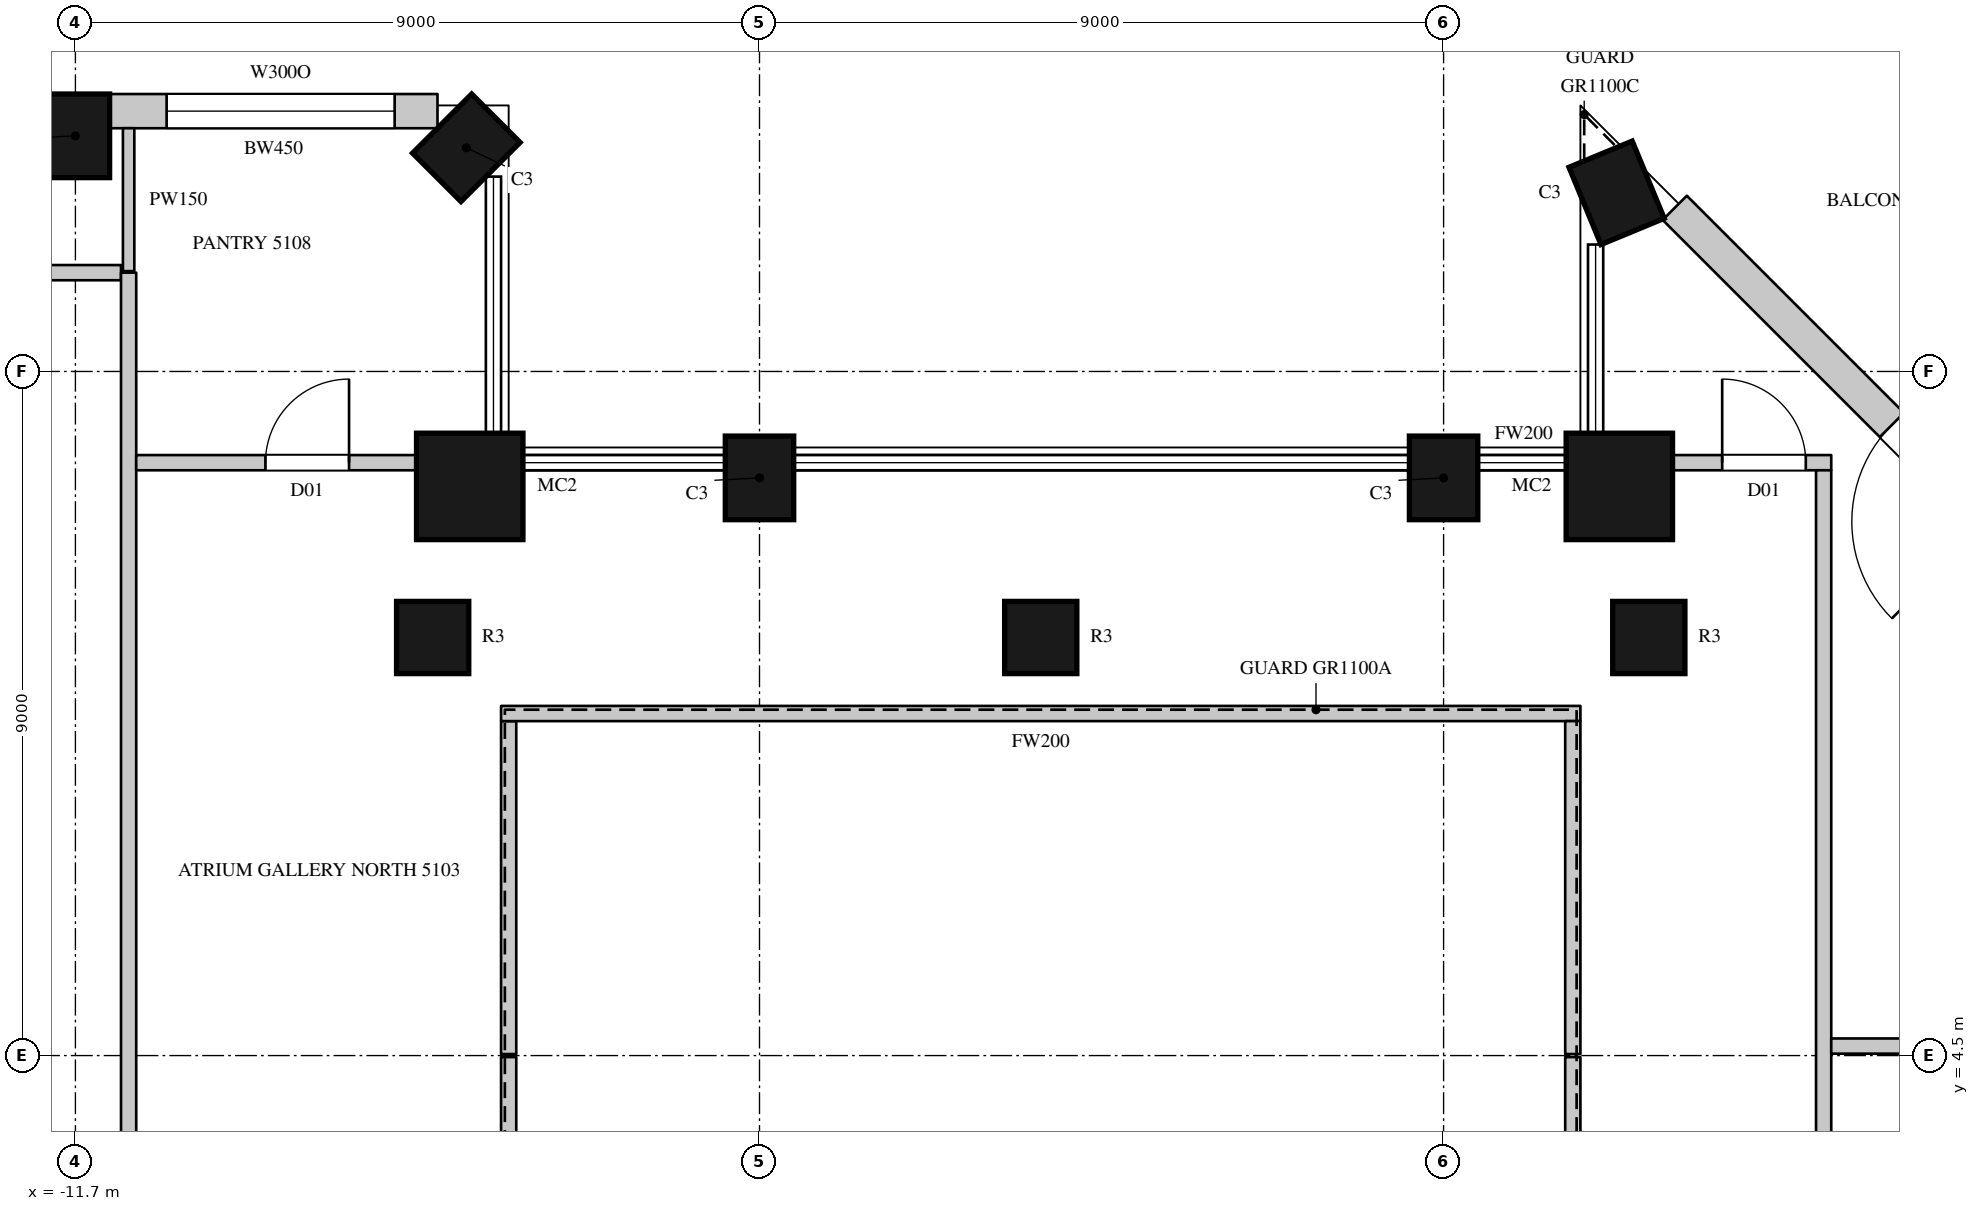
"""IFC4 building model, lengths in metres.
Left out: names, types, materials, properties, quantities, classifications, styles, units other than length and angle.
Written with IfcOpenShell. Run it as: python <this file> out.ifc"""

import sys

from ifc_helpers import new_model, si_unit, direction, frame, frame_2d, origin, origin_2d, place, context, subcontext, project, spatial, rectangle, circle, extrude, element, fill, save


model = new_model("IFC4")
c1 = context("Model", 3, precision=1e-05, world=origin(), true_north=direction((0.0, 1.0)))
c2 = subcontext(c1, "Body", "Model", "MODEL_VIEW")
j1 = project(units=[si_unit("LENGTHUNIT", "METRE"), si_unit("PLANEANGLEUNIT", "RADIAN")], contexts=[c1])
p1 = place(None, origin())
s1 = spatial("IfcSite", under=j1, at=p1, CompositionType="ELEMENT")
p2 = place(p1, origin())
s2 = spatial("IfcBuilding", under=s1, at=p2, CompositionType="ELEMENT")
p3 = place(p2, frame((0.0, 0.0, 230.2)))
s3 = spatial("IfcBuildingStorey", under=s2, at=p3, CompositionType="ELEMENT", Elevation=230.2)
p4 = place(p3, frame((8.576, 15.85, 0.0), z_axis=(0.0, 0.0, 1.0), x_axis=(-0.923879672772, -0.382683093746, 0.0)))
e1 = element("IfcColumn", 1, at=p4, inside=s3, PredefinedType="COLUMN", context=c2, shape_type="SweptSolid", body=[
    extrude(rectangle(XDim=0.9, YDim=1.1, at=origin_2d()), origin(), (0.0, 0.0, 1.0), 4.1),
])
p5 = place(p3, frame((8.612, 11.988, 0.0), z_axis=(0.0, 0.0, 1.0), x_axis=(1.0, 0.0, 0.0)))
e2 = element("IfcColumn", 2, at=p5, inside=s3, PredefinedType="COLUMN", context=c2, shape_type="SweptSolid", body=[
    extrude(circle(Radius=0.7, at=origin_2d()), origin(), (0.0, 0.0, 1.0), 4.1),
])
for number, where, z_axis, x_axis in (
    (3, (6.3, 12.1, 0.0), (0.0, 0.0, 1.0), (-1.0, 0.0, 0.0)),
    (4, (-2.7, 12.1, 0.0), (0.0, 0.0, 1.0), (-1.0, 0.0, 0.0)),
):
    element("IfcColumn", number, at=place(p3, frame(where, z_axis=z_axis, x_axis=x_axis)), inside=s3, PredefinedType="COLUMN", context=c2, shape_type="SweptSolid", body=[
        extrude(rectangle(XDim=0.9, YDim=1.1, at=origin_2d()), origin(), (0.0, 0.0, 1.0), 4.1),
    ])
p6 = place(p3, frame((-6.512, 11.988, 0.0), z_axis=(0.0, 0.0, 1.0), x_axis=(1.0, 0.0, 0.0)))
e5 = element("IfcColumn", 5, at=p6, inside=s3, PredefinedType="COLUMN", context=c2, shape_type="SweptSolid", body=[
    extrude(circle(Radius=0.7, at=origin_2d()), origin(), (0.0, 0.0, 1.0), 4.1),
])
for number, where, z_axis, x_axis in (
    (6, (-6.557, 16.443, 0.0), (0.0, 0.0, 1.0), (-0.707, 0.707, 0.0)),
    (7, (-11.7, 16.6, 0.0), (0.0, 0.0, 1.0), (-1.0, 0.0, 0.0)),
):
    element("IfcColumn", number, at=place(p3, frame(where, z_axis=z_axis, x_axis=x_axis)), inside=s3, PredefinedType="COLUMN", context=c2, shape_type="SweptSolid", body=[
        extrude(rectangle(XDim=0.9, YDim=1.1, at=origin_2d()), origin(), (0.0, 0.0, 1.0), 4.1),
    ])
for number, where, z_axis, x_axis in (
    (8, (-7.0, 10.0, 0.0), (0.0, 0.0, 1.0), (1.0, 0.0, 0.0)),
    (9, (1.0, 10.0, 0.0), (0.0, 0.0, 1.0), (1.0, 0.0, 0.0)),
    (10, (9.0, 10.0, 0.0), (0.0, 0.0, 1.0), (1.0, 0.0, 0.0)),
):
    element("IfcColumn", number, at=place(p3, frame(where, z_axis=z_axis, x_axis=x_axis)), inside=s3, PredefinedType="COLUMN", context=c2, shape_type="SweptSolid", body=[
        extrude(circle(Radius=0.475, at=origin_2d()), origin(), (0.0, 0.0, 1.0), 4.1),
    ])
p7 = place(p3, frame((13.941, 11.053, 0.0), z_axis=(0.0, 0.0, 1.0), x_axis=(-0.707106781187, 0.707106781187, 0.0)))
e11 = element("IfcWall", 11, at=p7, inside=s3, PredefinedType="SOLIDWALL", context=c2, shape_type="SweptSolid", body=[
    extrude(rectangle(XDim=6.505, YDim=0.45, at=frame_2d((3.252, 0.0))), origin(), (0.0, 0.0, 1.0), 3.8),
])
p8 = place(p7, frame((0.665, 0.0, 0.0)))
e12 = element("IfcOpeningElement", 12, at=p8, cuts=e11, PredefinedType="OPENING", context=c2, shape_type="SweptSolid", body=[
    extrude(rectangle(XDim=1.8, YDim=2.4, at=frame_2d((0.9, 1.2))), frame((0.0, 0.235, 0.0), z_axis=(0.0, -1.0, 0.0), x_axis=(1.0, 0.0, 0.0)), (0.0, 0.0, 1.0), 0.47),
])
p9 = place(p3, frame((-6.936, 16.925, 0.0), z_axis=(0.0, 0.0, 1.0), x_axis=(-1.0, 0.0, 0.0)))
e13 = element("IfcWall", 13, at=p9, inside=s3, PredefinedType="SOLIDWALL", context=c2, shape_type="SweptSolid", body=[
    extrude(rectangle(XDim=4.314, YDim=0.45, at=frame_2d((2.157, 0.0))), origin(), (0.0, 0.0, 1.0), 3.8),
])
p10 = place(p9, frame((0.564, 0.0, 1.05)))
e14 = element("IfcOpeningElement", 14, at=p10, cuts=e13, PredefinedType="OPENING", context=c2, shape_type="SweptSolid", body=[
    extrude(rectangle(XDim=3.0, YDim=2.4, at=frame_2d((1.5, 1.2))), frame((0.0, 0.235, 0.0), z_axis=(0.0, -1.0, 0.0), x_axis=(1.0, 0.0, 0.0)), (0.0, 0.0, 1.0), 0.47),
])
p11 = place(p3, frame((12.251, 14.263, 0.0), z_axis=(0.0, 0.0, 1.0), x_axis=(-0.707039709166, 0.707173846846, 0.0)))
e15 = element("IfcWall", 15, at=p11, inside=s3, PredefinedType="SOLIDWALL", context=c2, shape_type="SweptSolid", body=[
    extrude(rectangle(XDim=1.82, YDim=0.45, at=frame_2d((0.91, 0.0))), origin(), (0.0, 0.0, 1.0), 0.6),
])
p12 = place(p3, frame((-13.97, 14.8, 0.0), z_axis=(0.0, 0.0, 1.0), x_axis=(1.0, 0.0, 0.0)))
e16 = element("IfcWall", 16, at=p12, inside=s3, PredefinedType="PARTITIONING", context=c2, shape_type="SweptSolid", body=[
    extrude(rectangle(XDim=2.87, YDim=0.2, at=frame_2d((1.435, 0.0))), origin(), (0.0, 0.0, 1.0), 3.8),
])
p13 = place(p3, frame((-11.0, -14.8, 0.0), z_axis=(0.0, 0.0, 1.0), x_axis=(0.0, 1.0, 0.0)))
e17 = element("IfcWall", 17, at=p13, inside=s3, PredefinedType="PARTITIONING", context=c2, shape_type="SweptSolid", body=[
    extrude(rectangle(XDim=29.6, YDim=0.2, at=frame_2d((14.8, 0.0))), origin(), (0.0, 0.0, 1.0), 3.8),
])
p14 = place(p13, frame((10.15, 0.0, 0.0)))
e18 = element("IfcOpeningElement", 18, at=p14, cuts=e17, PredefinedType="OPENING", context=c2, shape_type="SweptSolid", body=[
    extrude(rectangle(XDim=1.5, YDim=2.4, at=frame_2d((0.75, 1.2))), frame((0.0, 0.11, 0.0), z_axis=(0.0, -1.0, 0.0), x_axis=(1.0, 0.0, 0.0)), (0.0, 0.0, 1.0), 0.22),
])
p15 = place(p3, frame((-10.9, 12.3, 0.0), z_axis=(0.0, 0.0, 1.0), x_axis=(1.0, 0.0, 0.0)))
e19 = element("IfcWall", 19, at=p15, inside=s3, PredefinedType="PARTITIONING", context=c2, shape_type="SweptSolid", body=[
    extrude(rectangle(XDim=3.735, YDim=0.2, at=frame_2d((1.867, 0.0))), origin(), (0.0, 0.0, 1.0), 3.8),
])
p16 = place(p15, frame((1.7, 0.0, 0.0)))
e20 = element("IfcOpeningElement", 20, at=p16, cuts=e19, PredefinedType="OPENING", context=c2, shape_type="SweptSolid", body=[
    extrude(rectangle(XDim=1.1, YDim=2.4, at=frame_2d((0.55, 1.2))), frame((0.0, 0.11, 0.0), z_axis=(0.0, -1.0, 0.0), x_axis=(1.0, 0.0, 0.0)), (0.0, 0.0, 1.0), 0.22),
])
p17 = place(p3, frame((-5.859, 12.3, 0.0), z_axis=(0.0, 0.0, 1.0), x_axis=(1.0, 0.0, 0.0)))
e21 = element("IfcWall", 21, at=p17, inside=s3, PredefinedType="PARTITIONING", context=c2, shape_type="SweptSolid", body=[
    extrude(rectangle(XDim=2.709, YDim=0.2, at=frame_2d((1.354, 0.0))), origin(), (0.0, 0.0, 1.0), 3.8),
])
p18 = place(p3, frame((-2.25, 12.3, 0.0), z_axis=(0.0, 0.0, 1.0), x_axis=(1.0, 0.0, 0.0)))
e22 = element("IfcWall", 22, at=p18, inside=s3, PredefinedType="PARTITIONING", context=c2, shape_type="SweptSolid", body=[
    extrude(rectangle(XDim=8.1, YDim=0.2, at=frame_2d((4.05, 0.0))), origin(), (0.0, 0.0, 1.0), 3.8),
])
p19 = place(p3, frame((6.75, 12.3, 0.0), z_axis=(0.0, 0.0, 1.0), x_axis=(1.0, 0.0, 0.0)))
e23 = element("IfcWall", 23, at=p19, inside=s3, PredefinedType="PARTITIONING", context=c2, shape_type="SweptSolid", body=[
    extrude(rectangle(XDim=1.209, YDim=0.2, at=frame_2d((0.604, 0.0))), origin(), (0.0, 0.0, 1.0), 3.8),
])
p20 = place(p3, frame((-6.0, -8.9, 0.0), z_axis=(0.0, 0.0, 1.0), x_axis=(0.0, 1.0, 0.0)))
e24 = element("IfcWall", 24, at=p20, inside=s3, PredefinedType="PARTITIONING", context=c2, shape_type="SweptSolid", body=[
    extrude(rectangle(XDim=13.38, YDim=0.2, at=frame_2d((6.69, 0.0))), origin(), (0.0, 0.0, 1.0), 3.8),
])
p21 = place(p3, frame((-6.0, 4.52, 0.0), z_axis=(0.0, 0.0, 1.0), x_axis=(0.0, 1.0, 0.0)))
e25 = element("IfcWall", 25, at=p21, inside=s3, PredefinedType="PARTITIONING", context=c2, shape_type="SweptSolid", body=[
    extrude(rectangle(XDim=4.38, YDim=0.2, at=frame_2d((2.19, 0.0))), origin(), (0.0, 0.0, 1.0), 3.8),
])
p22 = place(p3, frame((-6.1, 9.0, 0.0), z_axis=(0.0, 0.0, 1.0), x_axis=(1.0, 0.0, 0.0)))
e26 = element("IfcWall", 26, at=p22, inside=s3, PredefinedType="PARTITIONING", context=c2, shape_type="SweptSolid", body=[
    extrude(rectangle(XDim=14.2, YDim=0.2, at=frame_2d((7.1, 0.0))), origin(), (0.0, 0.0, 1.0), 3.8),
])
p23 = place(p3, frame((8.0, -8.9, 0.0), z_axis=(0.0, 0.0, 1.0), x_axis=(0.0, 1.0, 0.0)))
e27 = element("IfcWall", 27, at=p23, inside=s3, PredefinedType="PARTITIONING", context=c2, shape_type="SweptSolid", body=[
    extrude(rectangle(XDim=13.38, YDim=0.2, at=frame_2d((6.69, 0.0))), origin(), (0.0, 0.0, 1.0), 3.8),
])
p24 = place(p3, frame((8.0, 4.52, 0.0), z_axis=(0.0, 0.0, 1.0), x_axis=(0.0, 1.0, 0.0)))
e28 = element("IfcWall", 28, at=p24, inside=s3, PredefinedType="PARTITIONING", context=c2, shape_type="SweptSolid", body=[
    extrude(rectangle(XDim=4.38, YDim=0.2, at=frame_2d((2.19, 0.0))), origin(), (0.0, 0.0, 1.0), 3.8),
])
p25 = place(p3, frame((9.265, 12.3, 0.0), z_axis=(0.0, 0.0, 1.0), x_axis=(1.0, 0.0, 0.0)))
e29 = element("IfcWall", 29, at=p25, inside=s3, PredefinedType="PARTITIONING", context=c2, shape_type="SweptSolid", body=[
    extrude(rectangle(XDim=2.135, YDim=0.2, at=frame_2d((1.067, 0.0))), origin(), (0.0, 0.0, 1.0), 3.8),
])
p26 = place(p25, frame((0.7, 0.0, 0.0)))
e30 = element("IfcOpeningElement", 30, at=p26, cuts=e29, PredefinedType="OPENING", context=c2, shape_type="SweptSolid", body=[
    extrude(rectangle(XDim=1.1, YDim=2.4, at=frame_2d((0.55, 1.2))), frame((0.0, 0.11, 0.0), z_axis=(0.0, -1.0, 0.0), x_axis=(1.0, 0.0, 0.0)), (0.0, 0.0, 1.0), 0.22),
])
p27 = place(p3, frame((11.3, -12.3, 0.0), z_axis=(0.0, 0.0, 1.0), x_axis=(0.0, 1.0, 0.0)))
e31 = element("IfcWall", 31, at=p27, inside=s3, PredefinedType="PARTITIONING", context=c2, shape_type="SweptSolid", body=[
    extrude(rectangle(XDim=24.5, YDim=0.2, at=frame_2d((12.25, 0.0))), origin(), (0.0, 0.0, 1.0), 3.8),
])
p28 = place(p27, frame((10.15, 0.0, 0.0)))
e32 = element("IfcOpeningElement", 32, at=p28, cuts=e31, PredefinedType="OPENING", context=c2, shape_type="SweptSolid", body=[
    extrude(rectangle(XDim=1.5, YDim=2.4, at=frame_2d((0.75, 1.2))), frame((0.0, 0.11, 0.0), z_axis=(0.0, -1.0, 0.0), x_axis=(1.0, 0.0, 0.0)), (0.0, 0.0, 1.0), 0.22),
])
p29 = place(p27, frame((3.3, 0.0, 0.0)))
e33 = element("IfcOpeningElement", 33, at=p29, cuts=e31, PredefinedType="OPENING", context=c2, shape_type="SweptSolid", body=[
    extrude(rectangle(XDim=1.1, YDim=2.4, at=frame_2d((0.55, 1.2))), frame((0.0, 0.11, 0.0), z_axis=(0.0, -1.0, 0.0), x_axis=(1.0, 0.0, 0.0)), (0.0, 0.0, 1.0), 0.22),
])
p30 = place(p3, frame((11.4, 4.625, 0.0), z_axis=(0.0, 0.0, 1.0), x_axis=(1.0, 0.0, 0.0)))
e34 = element("IfcWall", 34, at=p30, inside=s3, PredefinedType="PARTITIONING", context=c2, shape_type="SweptSolid", body=[
    extrude(rectangle(XDim=3.275, YDim=0.2, at=frame_2d((1.638, 0.0))), origin(), (0.0, 0.0, 1.0), 3.8),
])
p31 = place(p3, frame((-11.0, 14.82, 0.0), z_axis=(0.0, 0.0, 1.0), x_axis=(0.0, 1.0, 0.0)))
e35 = element("IfcWall", 35, at=p31, inside=s3, PredefinedType="PARTITIONING", context=c2, shape_type="SweptSolid", body=[
    extrude(rectangle(XDim=1.88, YDim=0.15, at=frame_2d((0.94, 0.0))), origin(), (0.0, 0.0, 1.0), 3.8),
])
p32 = place(p8, origin())
e36 = element("IfcDoor", 36, at=p32, inside=s3, OperationType="SLIDING_TO_LEFT", PredefinedType="DOOR", context=c2, shape_type="SweptSolid", body=[
    extrude(rectangle(XDim=1.8, YDim=2.4, at=frame_2d((0.9, 1.2))), frame((0.0, 0.13, 0.0), z_axis=(0.0, -1.0, 0.0), x_axis=(1.0, 0.0, 0.0)), (0.0, 0.0, 1.0), 0.05),
])
fill(e12, e36)
p33 = place(p10, origin())
e37 = element("IfcWindow", 37, at=p33, inside=s3, PartitioningType="SINGLE_PANEL", PredefinedType="WINDOW", context=c2, shape_type="SweptSolid", body=[
    extrude(rectangle(XDim=3.0, YDim=2.4, at=frame_2d((1.5, 1.2))), frame((0.0, 0.135, 0.0), z_axis=(0.0, -1.0, 0.0), x_axis=(1.0, 0.0, 0.0)), (0.0, 0.0, 1.0), 0.06),
])
fill(e14, e37)
p34 = place(p16, origin())
e38 = element("IfcDoor", 38, at=p34, inside=s3, OperationType="SINGLE_SWING_RIGHT", PredefinedType="DOOR", context=c2, shape_type="SweptSolid", body=[
    extrude(rectangle(XDim=1.1, YDim=2.4, at=frame_2d((0.55, 1.2))), frame((0.0, 0.025, 0.0), z_axis=(0.0, -1.0, 0.0), x_axis=(1.0, 0.0, 0.0)), (0.0, 0.0, 1.0), 0.05),
])
fill(e20, e38)
p35 = place(p26, origin())
e39 = element("IfcDoor", 39, at=p35, inside=s3, OperationType="SINGLE_SWING_LEFT", PredefinedType="DOOR", context=c2, shape_type="SweptSolid", body=[
    extrude(rectangle(XDim=1.1, YDim=2.4, at=frame_2d((0.55, 1.2))), frame((0.0, 0.025, 0.0), z_axis=(0.0, -1.0, 0.0), x_axis=(1.0, 0.0, 0.0)), (0.0, 0.0, 1.0), 0.05),
])
fill(e30, e39)
save(model, sys.argv[1])
